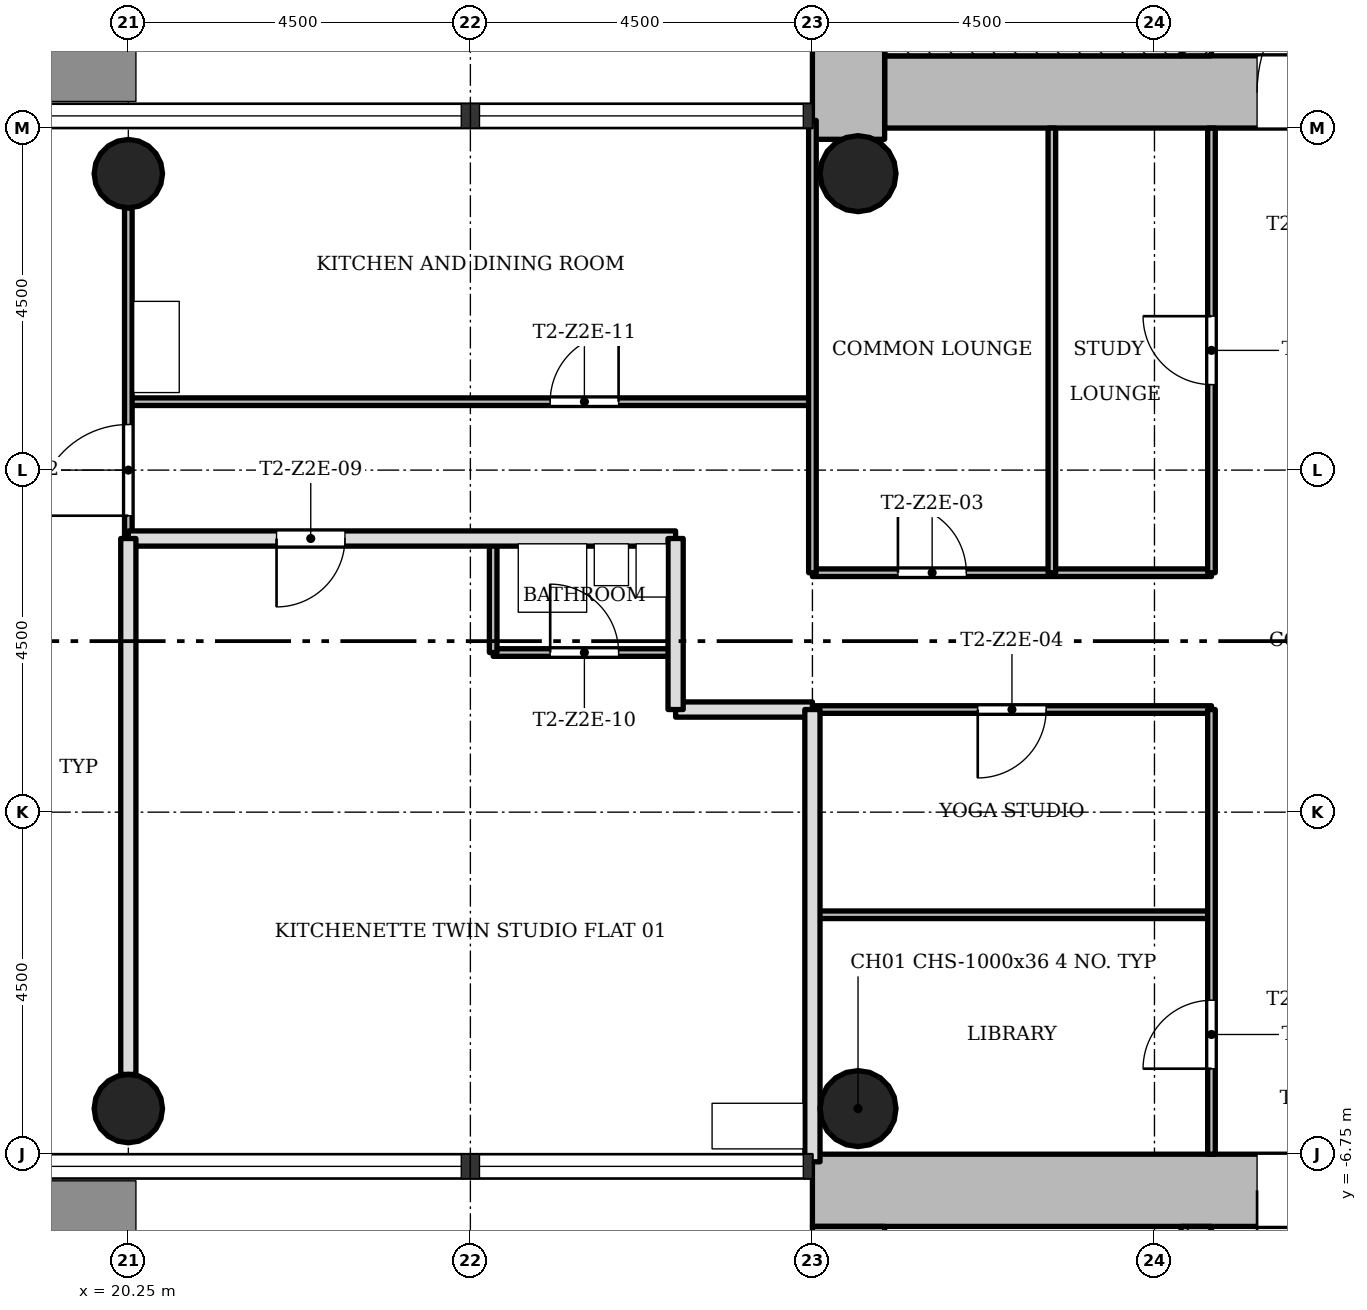
"""IFC4 building model, lengths in metres.
Left out: names, types, materials, properties, quantities, classifications, styles, units other than length and angle.
Written with IfcOpenShell. Run it as: python <this file> out.ifc"""

import sys

from ifc_helpers import new_model, si_unit, direction, frame, frame_2d, origin, origin_2d, place, context, subcontext, project, spatial, rectangle, hollow_circle, extrude, element, fill, save


model = new_model("IFC4")
c1 = context("Model", 3, precision=1e-05, world=origin(), true_north=direction((0.0, 1.0)))
c2 = subcontext(c1, "Body", "Model", "MODEL_VIEW")
j1 = project(units=[si_unit("LENGTHUNIT", "METRE"), si_unit("PLANEANGLEUNIT", "RADIAN")], contexts=[c1])
p1 = place(None, origin())
s1 = spatial("IfcSite", under=j1, at=p1, CompositionType="ELEMENT")
p2 = place(p1, origin())
s2 = spatial("IfcBuilding", under=s1, at=p2, CompositionType="ELEMENT")
p3 = place(p2, frame((0.0, 0.0, 100.4)))
s3 = spatial("IfcBuildingStorey", under=s2, at=p3, CompositionType="ELEMENT", Elevation=100.4)
p4 = place(p3, frame((30.2, 7.225, 0.0), z_axis=(0.0, 0.0, 1.0), x_axis=(1.0, 0.0, 0.0)))
e1 = element("IfcWall", 1, at=p4, inside=s3, PredefinedType="SHEAR", context=c2, shape_type="SweptSolid", body=[
    extrude(rectangle(XDim=12.55, YDim=0.95, at=frame_2d((6.275, 0.0))), origin(), (0.0, 0.0, 1.0), 3.4),
])
p5 = place(p4, frame((4.9, 0.0, 0.0)))
e2 = element("IfcOpeningElement", 2, at=p5, cuts=e1, PredefinedType="OPENING", context=c2, shape_type="SweptSolid", body=[
    extrude(rectangle(XDim=1.8, YDim=2.1, at=frame_2d((0.9, 1.05))), frame((0.0, 0.485, 0.0), z_axis=(0.0, -1.0, 0.0), x_axis=(1.0, 0.0, 0.0)), (0.0, 0.0, 1.0), 0.97),
])
p6 = place(p3, frame((29.725, 15.298, 0.0), z_axis=(0.0, 0.0, 1.0), x_axis=(0.0, -1.0, 0.0)))
e3 = element("IfcWall", 3, at=p6, inside=s3, PredefinedType="SHEAR", context=c2, shape_type="SweptSolid", body=[
    extrude(rectangle(XDim=8.696, YDim=0.95, at=frame_2d((4.348, 0.0))), origin(), (0.0, 0.0, 1.0), 3.4),
])
p7 = place(p3, frame((34.3, 7.7, 0.0), z_axis=(0.0, 0.0, 1.0), x_axis=(0.0, 1.0, 0.0)))
e4 = element("IfcWall", 4, at=p7, inside=s3, PredefinedType="SHEAR", context=c2, shape_type="SweptSolid", body=[
    extrude(rectangle(XDim=7.1, YDim=0.4, at=frame_2d((3.55, 0.0))), origin(), (0.0, 0.0, 1.0), 3.4),
])
p8 = place(p7, frame((0.7, 0.0, 0.0)))
e5 = element("IfcOpeningElement", 5, at=p8, cuts=e4, PredefinedType="OPENING", context=c2, shape_type="SweptSolid", body=[
    extrude(rectangle(XDim=0.9, YDim=2.1, at=frame_2d((0.45, 1.05))), frame((0.0, 0.21, 0.0), z_axis=(0.0, -1.0, 0.0), x_axis=(1.0, 0.0, 0.0)), (0.0, 0.0, 1.0), 0.42),
])
p9 = place(p3, frame((41.8, -7.225, 0.0), z_axis=(0.0, 0.0, 1.0), x_axis=(-1.0, 0.0, 0.0)))
e6 = element("IfcWall", 6, at=p9, inside=s3, PredefinedType="SHEAR", context=c2, shape_type="SweptSolid", body=[
    extrude(rectangle(XDim=12.55, YDim=0.95, at=frame_2d((6.275, 0.0))), origin(), (0.0, 0.0, 1.0), 3.4),
])
p10 = place(p9, frame((4.9, 0.0, 0.0)))
e7 = element("IfcOpeningElement", 7, at=p10, cuts=e6, PredefinedType="OPENING", context=c2, shape_type="SweptSolid", body=[
    extrude(rectangle(XDim=1.8, YDim=2.1, at=frame_2d((0.9, 1.05))), frame((0.0, 0.485, 0.0), z_axis=(0.0, -1.0, 0.0), x_axis=(1.0, 0.0, 0.0)), (0.0, 0.0, 1.0), 0.97),
])
p11 = place(p3, frame((29.725, -7.7, 0.0), z_axis=(0.0, 0.0, 1.0), x_axis=(0.0, -1.0, 0.0)))
e8 = element("IfcWall", 8, at=p11, inside=s3, PredefinedType="SHEAR", context=c2, shape_type="SweptSolid", body=[
    extrude(rectangle(XDim=8.05, YDim=0.95, at=frame_2d((4.025, 0.0))), origin(), (0.0, 0.0, 1.0), 3.4),
])
p12 = place(p3, frame((34.3, -14.8, 0.0), z_axis=(0.0, 0.0, 1.0), x_axis=(0.0, 1.0, 0.0)))
e9 = element("IfcWall", 9, at=p12, inside=s3, PredefinedType="SHEAR", context=c2, shape_type="SweptSolid", body=[
    extrude(rectangle(XDim=7.1, YDim=0.4, at=frame_2d((3.55, 0.0))), origin(), (0.0, 0.0, 1.0), 3.4),
])
p13 = place(p12, frame((5.2, 0.0, 0.0)))
e10 = element("IfcOpeningElement", 10, at=p13, cuts=e9, PredefinedType="OPENING", context=c2, shape_type="SweptSolid", body=[
    extrude(rectangle(XDim=1.1, YDim=2.1, at=frame_2d((0.55, 1.05))), frame((0.0, 0.21, 0.0), z_axis=(0.0, -1.0, 0.0), x_axis=(1.0, 0.0, 0.0)), (0.0, 0.0, 1.0), 0.42),
])
for number, where, z_axis, x_axis in (
    (11, (20.25, 6.15, 0.0), (0.0, 0.0, 1.0), (1.0, 0.0, 0.0)),
    (12, (20.25, -6.15, 0.0), (0.0, 0.0, 1.0), (1.0, 0.0, 0.0)),
):
    element("IfcColumn", number, at=place(p3, frame(where, z_axis=z_axis, x_axis=x_axis)), inside=s3, PredefinedType="COLUMN", context=c2, shape_type="SweptSolid", body=[
        extrude(hollow_circle(Radius=0.45, WallThickness=0.032, at=origin_2d()), origin(), (0.0, 0.0, 1.0), 3.4),
    ])
for number, where, z_axis, x_axis in (
    (13, (29.85, 6.15, 0.0), (0.0, 0.0, 1.0), (1.0, 0.0, 0.0)),
    (14, (29.85, -6.15, 0.0), (0.0, 0.0, 1.0), (1.0, 0.0, 0.0)),
):
    element("IfcColumn", number, at=place(p3, frame(where, z_axis=z_axis, x_axis=x_axis)), inside=s3, PredefinedType="COLUMN", context=c2, shape_type="SweptSolid", body=[
        extrude(hollow_circle(Radius=0.5, WallThickness=0.036, at=origin_2d()), origin(), (0.0, 0.0, 1.0), 3.4),
    ])
p14 = place(p3, frame((34.5, -3.6, 0.0), z_axis=(0.0, 0.0, 1.0), x_axis=(-1.0, 0.0, 0.0)))
e15 = element("IfcWall", 15, at=p14, inside=s3, PredefinedType="PARTITIONING", context=c2, shape_type="SweptSolid", body=[
    extrude(rectangle(XDim=5.25, YDim=0.1, at=frame_2d((2.625, 0.0))), origin(), (0.0, 0.0, 1.0), 3.0),
])
p15 = place(p3, frame((34.5, -0.9, 0.0), z_axis=(0.0, 0.0, 1.0), x_axis=(-1.0, 0.0, 0.0)))
e16 = element("IfcWall", 16, at=p15, inside=s3, PredefinedType="PARTITIONING", context=c2, shape_type="SweptSolid", body=[
    extrude(rectangle(XDim=5.25, YDim=0.1, at=frame_2d((2.625, 0.0))), origin(), (0.0, 0.0, 1.0), 3.0),
])
p16 = place(p15, frame((2.175, 0.0, 0.0)))
e17 = element("IfcOpeningElement", 17, at=p16, cuts=e16, PredefinedType="OPENING", context=c2, shape_type="SweptSolid", body=[
    extrude(rectangle(XDim=0.9, YDim=2.1, at=frame_2d((0.45, 1.05))), frame((0.0, 0.06, 0.0), z_axis=(0.0, -1.0, 0.0), x_axis=(1.0, 0.0, 0.0)), (0.0, 0.0, 1.0), 0.12),
])
p17 = place(p3, frame((29.25, -0.9, 0.0), z_axis=(0.0, 0.0, 1.0), x_axis=(-1.0, 0.0, 0.0)))
e18 = element("IfcWall", 18, at=p17, inside=s3, PredefinedType="SOLIDWALL", context=c2, shape_type="SweptSolid", body=[
    extrude(rectangle(XDim=1.8, YDim=0.2, at=frame_2d((0.9, 0.0))), origin(), (0.0, 0.0, 1.0), 3.0),
])
p18 = place(p3, frame((27.45, -0.15, 0.0), z_axis=(0.0, 0.0, 1.0), x_axis=(-1.0, 0.0, 0.0)))
e19 = element("IfcWall", 19, at=p18, inside=s3, PredefinedType="PARTITIONING", context=c2, shape_type="SweptSolid", body=[
    extrude(rectangle(XDim=2.4, YDim=0.1, at=frame_2d((1.2, 0.0))), origin(), (0.0, 0.0, 1.0), 3.0),
])
p19 = place(p18, frame((0.75, 0.0, 0.0)))
e20 = element("IfcOpeningElement", 20, at=p19, cuts=e19, PredefinedType="OPENING", context=c2, shape_type="SweptSolid", body=[
    extrude(rectangle(XDim=0.9, YDim=2.1, at=frame_2d((0.45, 1.05))), frame((0.0, 0.06, 0.0), z_axis=(0.0, -1.0, 0.0), x_axis=(1.0, 0.0, 0.0)), (0.0, 0.0, 1.0), 0.12),
])
p20 = place(p3, frame((34.5, 0.9, 0.0), z_axis=(0.0, 0.0, 1.0), x_axis=(-1.0, 0.0, 0.0)))
e21 = element("IfcWall", 21, at=p20, inside=s3, PredefinedType="PARTITIONING", context=c2, shape_type="SweptSolid", body=[
    extrude(rectangle(XDim=5.25, YDim=0.1, at=frame_2d((2.625, 0.0))), origin(), (0.0, 0.0, 1.0), 3.0),
])
p21 = place(p20, frame((3.225, 0.0, 0.0)))
e22 = element("IfcOpeningElement", 22, at=p21, cuts=e21, PredefinedType="OPENING", context=c2, shape_type="SweptSolid", body=[
    extrude(rectangle(XDim=0.9, YDim=2.1, at=frame_2d((0.45, 1.05))), frame((0.0, 0.06, 0.0), z_axis=(0.0, -1.0, 0.0), x_axis=(1.0, 0.0, 0.0)), (0.0, 0.0, 1.0), 0.12),
])
p22 = place(p3, frame((27.45, 1.35, 0.0), z_axis=(0.0, 0.0, 1.0), x_axis=(-1.0, 0.0, 0.0)))
e23 = element("IfcWall", 23, at=p22, inside=s3, PredefinedType="SOLIDWALL", context=c2, shape_type="SweptSolid", body=[
    extrude(rectangle(XDim=7.2, YDim=0.2, at=frame_2d((3.6, 0.0))), origin(), (0.0, 0.0, 1.0), 3.0),
])
p23 = place(p22, frame((4.35, 0.0, 0.0)))
e24 = element("IfcOpeningElement", 24, at=p23, cuts=e23, PredefinedType="OPENING", context=c2, shape_type="SweptSolid", body=[
    extrude(rectangle(XDim=0.9, YDim=2.1, at=frame_2d((0.45, 1.05))), frame((0.0, 0.11, 0.0), z_axis=(0.0, -1.0, 0.0), x_axis=(1.0, 0.0, 0.0)), (0.0, 0.0, 1.0), 0.22),
])
p24 = place(p3, frame((29.25, 3.15, 0.0), z_axis=(0.0, 0.0, 1.0), x_axis=(-1.0, 0.0, 0.0)))
e25 = element("IfcWall", 25, at=p24, inside=s3, PredefinedType="PARTITIONING", context=c2, shape_type="SweptSolid", body=[
    extrude(rectangle(XDim=9.0, YDim=0.1, at=frame_2d((4.5, 0.0))), origin(), (0.0, 0.0, 1.0), 3.0),
])
p25 = place(p24, frame((2.55, 0.0, 0.0)))
e26 = element("IfcOpeningElement", 26, at=p25, cuts=e25, PredefinedType="OPENING", context=c2, shape_type="SweptSolid", body=[
    extrude(rectangle(XDim=0.9, YDim=2.1, at=frame_2d((0.45, 1.05))), frame((0.0, 0.06, 0.0), z_axis=(0.0, -1.0, 0.0), x_axis=(1.0, 0.0, 0.0)), (0.0, 0.0, 1.0), 0.12),
])
p26 = place(p3, frame((34.5, -6.75, 0.0), z_axis=(0.0, 0.0, 1.0), x_axis=(0.0, 1.0, 0.0)))
e27 = element("IfcWall", 27, at=p26, inside=s3, PredefinedType="PARTITIONING", context=c2, shape_type="SweptSolid", body=[
    extrude(rectangle(XDim=5.85, YDim=0.1, at=frame_2d((2.925, 0.0))), origin(), (0.0, 0.0, 1.0), 3.0),
])
p27 = place(p26, frame((1.125, 0.0, 0.0)))
e28 = element("IfcOpeningElement", 28, at=p27, cuts=e27, PredefinedType="OPENING", context=c2, shape_type="SweptSolid", body=[
    extrude(rectangle(XDim=0.9, YDim=2.1, at=frame_2d((0.45, 1.05))), frame((0.0, 0.06, 0.0), z_axis=(0.0, -1.0, 0.0), x_axis=(1.0, 0.0, 0.0)), (0.0, 0.0, 1.0), 0.12),
])
p28 = place(p3, frame((34.5, 0.9, 0.0), z_axis=(0.0, 0.0, 1.0), x_axis=(0.0, 1.0, 0.0)))
e29 = element("IfcWall", 29, at=p28, inside=s3, PredefinedType="PARTITIONING", context=c2, shape_type="SweptSolid", body=[
    extrude(rectangle(XDim=5.85, YDim=0.1, at=frame_2d((2.925, 0.0))), origin(), (0.0, 0.0, 1.0), 3.0),
])
p29 = place(p28, frame((2.475, 0.0, 0.0)))
e30 = element("IfcOpeningElement", 30, at=p29, cuts=e29, PredefinedType="OPENING", context=c2, shape_type="SweptSolid", body=[
    extrude(rectangle(XDim=0.9, YDim=2.1, at=frame_2d((0.45, 1.05))), frame((0.0, 0.06, 0.0), z_axis=(0.0, -1.0, 0.0), x_axis=(1.0, 0.0, 0.0)), (0.0, 0.0, 1.0), 0.12),
])
p30 = place(p3, frame((32.4, 0.9, 0.0), z_axis=(0.0, 0.0, 1.0), x_axis=(0.0, 1.0, 0.0)))
e31 = element("IfcWall", 31, at=p30, inside=s3, PredefinedType="PARTITIONING", context=c2, shape_type="SweptSolid", body=[
    extrude(rectangle(XDim=5.85, YDim=0.1, at=frame_2d((2.925, 0.0))), origin(), (0.0, 0.0, 1.0), 3.0),
])
p31 = place(p3, frame((29.25, 0.9, 0.0), z_axis=(0.0, 0.0, 1.0), x_axis=(0.0, 1.0, 0.0)))
e32 = element("IfcWall", 32, at=p31, inside=s3, PredefinedType="PARTITIONING", context=c2, shape_type="SweptSolid", body=[
    extrude(rectangle(XDim=5.95, YDim=0.1, at=frame_2d((2.975, 0.0))), origin(), (0.0, 0.0, 1.0), 3.0),
])
p32 = place(p3, frame((29.25, -6.85, 0.0), z_axis=(0.0, 0.0, 1.0), x_axis=(0.0, 1.0, 0.0)))
e33 = element("IfcWall", 33, at=p32, inside=s3, PredefinedType="SOLIDWALL", context=c2, shape_type="SweptSolid", body=[
    extrude(rectangle(XDim=5.95, YDim=0.2, at=frame_2d((2.975, 0.0))), origin(), (0.0, 0.0, 1.0), 3.0),
])
p33 = place(p3, frame((27.45, -0.9, 0.0), z_axis=(0.0, 0.0, 1.0), x_axis=(0.0, 1.0, 0.0)))
e34 = element("IfcWall", 34, at=p33, inside=s3, PredefinedType="SOLIDWALL", context=c2, shape_type="SweptSolid", body=[
    extrude(rectangle(XDim=2.25, YDim=0.2, at=frame_2d((1.125, 0.0))), origin(), (0.0, 0.0, 1.0), 3.0),
])
p34 = place(p3, frame((25.05, -0.15, 0.0), z_axis=(0.0, 0.0, 1.0), x_axis=(0.0, 1.0, 0.0)))
e35 = element("IfcWall", 35, at=p34, inside=s3, PredefinedType="PARTITIONING", context=c2, shape_type="SweptSolid", body=[
    extrude(rectangle(XDim=1.5, YDim=0.1, at=frame_2d((0.75, 0.0))), origin(), (0.0, 0.0, 1.0), 3.0),
])
p35 = place(p3, frame((20.25, 1.35, 0.0), z_axis=(0.0, 0.0, 1.0), x_axis=(0.0, 1.0, 0.0)))
e36 = element("IfcWall", 36, at=p35, inside=s3, PredefinedType="PARTITIONING", context=c2, shape_type="SweptSolid", body=[
    extrude(rectangle(XDim=4.35, YDim=0.1, at=frame_2d((2.175, 0.0))), origin(), (0.0, 0.0, 1.0), 3.0),
])
p36 = place(p35, frame((0.3, 0.0, 0.0)))
e37 = element("IfcOpeningElement", 37, at=p36, cuts=e36, PredefinedType="OPENING", context=c2, shape_type="SweptSolid", body=[
    extrude(rectangle(XDim=1.2, YDim=2.1, at=frame_2d((0.6, 1.05))), frame((0.0, 0.06, 0.0), z_axis=(0.0, -1.0, 0.0), x_axis=(1.0, 0.0, 0.0)), (0.0, 0.0, 1.0), 0.12),
])
p37 = place(p3, frame((20.25, -5.7, 0.0), z_axis=(0.0, 0.0, 1.0), x_axis=(0.0, 1.0, 0.0)))
e38 = element("IfcWall", 38, at=p37, inside=s3, PredefinedType="SOLIDWALL", context=c2, shape_type="SweptSolid", body=[
    extrude(rectangle(XDim=7.05, YDim=0.2, at=frame_2d((3.525, 0.0))), origin(), (0.0, 0.0, 1.0), 3.0),
])
p38 = place(p3, frame((34.1, 7.825, 0.0), z_axis=(0.0, 0.0, 1.0), x_axis=(-1.0, 0.0, 0.0)))
e39 = element("IfcWall", 39, at=p38, inside=s3, PredefinedType="SHEAR", context=c2, shape_type="SweptSolid", body=[
    extrude(rectangle(XDim=3.9, YDim=0.25, at=frame_2d((1.95, 0.0))), origin(), (0.0, 0.0, 1.0), 3.4),
])
p39 = place(p29, origin())
e40 = element("IfcDoor", 40, at=p39, inside=s3, OperationType="SINGLE_SWING_LEFT", PredefinedType="DOOR", context=c2, shape_type="SweptSolid", body=[
    extrude(rectangle(XDim=0.9, YDim=2.1, at=frame_2d((0.45, 1.05))), frame((0.0, 0.025, 0.0), z_axis=(0.0, -1.0, 0.0), x_axis=(1.0, 0.0, 0.0)), (0.0, 0.0, 1.0), 0.05),
])
fill(e30, e40)
p40 = place(p21, origin())
e41 = element("IfcDoor", 41, at=p40, inside=s3, OperationType="SINGLE_SWING_RIGHT", PredefinedType="DOOR", context=c2, shape_type="SweptSolid", body=[
    extrude(rectangle(XDim=0.9, YDim=2.1, at=frame_2d((0.45, 1.05))), frame((0.0, 0.025, 0.0), z_axis=(0.0, -1.0, 0.0), x_axis=(1.0, 0.0, 0.0)), (0.0, 0.0, 1.0), 0.05),
])
fill(e22, e41)
p41 = place(p16, origin())
e42 = element("IfcDoor", 42, at=p41, inside=s3, OperationType="SINGLE_SWING_LEFT", PredefinedType="DOOR", context=c2, shape_type="SweptSolid", body=[
    extrude(rectangle(XDim=0.9, YDim=2.1, at=frame_2d((0.45, 1.05))), frame((0.0, 0.025, 0.0), z_axis=(0.0, -1.0, 0.0), x_axis=(1.0, 0.0, 0.0)), (0.0, 0.0, 1.0), 0.05),
])
fill(e17, e42)
p42 = place(p27, origin())
e43 = element("IfcDoor", 43, at=p42, inside=s3, OperationType="SINGLE_SWING_RIGHT", PredefinedType="DOOR", context=c2, shape_type="SweptSolid", body=[
    extrude(rectangle(XDim=0.9, YDim=2.1, at=frame_2d((0.45, 1.05))), frame((0.0, 0.025, 0.0), z_axis=(0.0, -1.0, 0.0), x_axis=(1.0, 0.0, 0.0)), (0.0, 0.0, 1.0), 0.05),
])
fill(e28, e43)
p43 = place(p23, origin())
e44 = element("IfcDoor", 44, at=p43, inside=s3, OperationType="SINGLE_SWING_LEFT", PredefinedType="DOOR", context=c2, shape_type="SweptSolid", body=[
    extrude(rectangle(XDim=0.9, YDim=2.1, at=frame_2d((0.45, 1.05))), frame((0.0, 0.025, 0.0), z_axis=(0.0, -1.0, 0.0), x_axis=(1.0, 0.0, 0.0)), (0.0, 0.0, 1.0), 0.05),
])
fill(e24, e44)
p44 = place(p19, origin())
e45 = element("IfcDoor", 45, at=p44, inside=s3, OperationType="SINGLE_SWING_RIGHT", PredefinedType="DOOR", context=c2, shape_type="SweptSolid", body=[
    extrude(rectangle(XDim=0.9, YDim=2.1, at=frame_2d((0.45, 1.05))), frame((0.0, 0.025, 0.0), z_axis=(0.0, -1.0, 0.0), x_axis=(1.0, 0.0, 0.0)), (0.0, 0.0, 1.0), 0.05),
])
fill(e20, e45)
p45 = place(p25, origin())
e46 = element("IfcDoor", 46, at=p45, inside=s3, OperationType="SINGLE_SWING_LEFT", PredefinedType="DOOR", context=c2, shape_type="SweptSolid", body=[
    extrude(rectangle(XDim=0.9, YDim=2.1, at=frame_2d((0.45, 1.05))), frame((0.0, 0.025, 0.0), z_axis=(0.0, -1.0, 0.0), x_axis=(1.0, 0.0, 0.0)), (0.0, 0.0, 1.0), 0.05),
])
fill(e26, e46)
p46 = place(p36, origin())
e47 = element("IfcDoor", 47, at=p46, inside=s3, OperationType="SINGLE_SWING_RIGHT", PredefinedType="DOOR", context=c2, shape_type="SweptSolid", body=[
    extrude(rectangle(XDim=1.2, YDim=2.1, at=frame_2d((0.6, 1.05))), frame((0.0, 0.025, 0.0), z_axis=(0.0, -1.0, 0.0), x_axis=(1.0, 0.0, 0.0)), (0.0, 0.0, 1.0), 0.05),
])
fill(e37, e47)
p47 = place(p5, origin())
e48 = element("IfcDoor", 48, at=p47, inside=s3, OperationType="SINGLE_SWING_LEFT", PredefinedType="DOOR", context=c2, shape_type="SweptSolid", body=[
    extrude(rectangle(XDim=1.8, YDim=2.1, at=frame_2d((0.9, 1.05))), frame((0.0, 0.025, 0.0), z_axis=(0.0, -1.0, 0.0), x_axis=(1.0, 0.0, 0.0)), (0.0, 0.0, 1.0), 0.05),
])
fill(e2, e48)
p48 = place(p10, origin())
e49 = element("IfcDoor", 49, at=p48, inside=s3, OperationType="SINGLE_SWING_LEFT", PredefinedType="DOOR", context=c2, shape_type="SweptSolid", body=[
    extrude(rectangle(XDim=1.8, YDim=2.1, at=frame_2d((0.9, 1.05))), frame((0.0, 0.025, 0.0), z_axis=(0.0, -1.0, 0.0), x_axis=(1.0, 0.0, 0.0)), (0.0, 0.0, 1.0), 0.05),
])
fill(e7, e49)
save(model, sys.argv[1])
